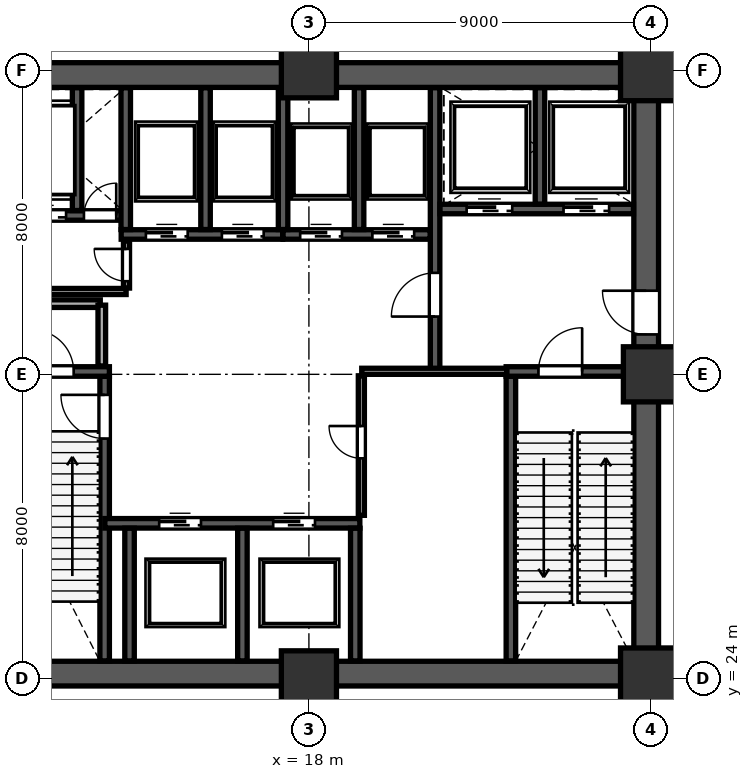
"""IFC4 building model, lengths in metres.
Left out: names, types, materials, properties, quantities, classifications, styles, units other than length and angle.
Written with IfcOpenShell. Run it as: python <this file> out.ifc"""

import sys

from ifc_helpers import new_model, si_unit, direction, frame, frame_2d, origin, origin_2d, place, context, subcontext, project, spatial, rectangle, extrude, source, transform, mapped, element, fill, save


model = new_model("IFC4")
c1 = context("Model", 3, precision=1e-05, world=origin(), true_north=direction((0.0, 1.0)))
c2 = subcontext(c1, "Body", "Model", "MODEL_VIEW")
j1 = project(units=[si_unit("LENGTHUNIT", "METRE"), si_unit("PLANEANGLEUNIT", "RADIAN")], contexts=[c1])
p1 = place(None, origin())
s1 = spatial("IfcSite", under=j1, at=p1, CompositionType="ELEMENT")
p2 = place(p1, origin())
s2 = spatial("IfcBuilding", under=s1, at=p2, CompositionType="ELEMENT")
p3 = place(p2, origin())
s3 = spatial("IfcBuildingStorey", under=s2, at=p3, CompositionType="ELEMENT", Elevation=0.0)
m1 = source(origin(), c2, "Body", "SweptSolid", [
    extrude(rectangle(XDim=1.45, YDim=1.45, at=origin_2d()), origin(), (0.0, 0.0, 1.0), 5.999),
])
p4 = place(p3, frame((18.0, 24.0, 0.001), z_axis=(0.0, 0.0, 1.0), x_axis=(1.0, 0.0, 0.0)))
e1 = element("IfcColumn", 1, at=p4, inside=s3, PredefinedType="COLUMN", context=c2, shape_type="MappedRepresentation", body=[
    mapped(m1, transform((0.0, 0.0, 0.0), scale=1.0)),
])
m2 = source(origin(), c2, "Body", "SweptSolid", [
    extrude(rectangle(XDim=1.45, YDim=1.45, at=origin_2d()), origin(), (0.0, 0.0, 1.0), 5.999),
])
p5 = place(p3, frame((18.0, 40.0, 0.001), z_axis=(0.0, 0.0, 1.0), x_axis=(1.0, 0.0, 0.0)))
e2 = element("IfcColumn", 2, at=p5, inside=s3, PredefinedType="COLUMN", context=c2, shape_type="MappedRepresentation", body=[
    mapped(m2, transform((0.0, 0.0, 0.0), scale=1.0)),
])
m3 = source(origin(), c2, "Body", "SweptSolid", [
    extrude(rectangle(XDim=1.6, YDim=1.6, at=origin_2d()), origin(), (0.0, 0.0, 1.0), 5.999),
])
p6 = place(p3, frame((27.0, 24.0, 0.001), z_axis=(0.0, 0.0, 1.0), x_axis=(1.0, 0.0, 0.0)))
e3 = element("IfcColumn", 3, at=p6, inside=s3, PredefinedType="COLUMN", context=c2, shape_type="MappedRepresentation", body=[
    mapped(m3, transform((0.0, 0.0, 0.0), scale=1.0)),
])
p7 = place(p3, frame((27.0, 32.0, 0.001), z_axis=(0.0, 0.0, 1.0), x_axis=(1.0, 0.0, 0.0)))
e4 = element("IfcColumn", 4, at=p7, inside=s3, PredefinedType="COLUMN", context=c2, shape_type="MappedRepresentation", body=[
    mapped(m2, transform((0.0, 0.0, 0.0), scale=1.0)),
])
m4 = source(origin(), c2, "Body", "SweptSolid", [
    extrude(rectangle(XDim=1.6, YDim=1.6, at=origin_2d()), origin(), (0.0, 0.0, 1.0), 5.999),
])
p8 = place(p3, frame((27.0, 40.0, 0.001), z_axis=(0.0, 0.0, 1.0), x_axis=(1.0, 0.0, 0.0)))
e5 = element("IfcColumn", 5, at=p8, inside=s3, PredefinedType="COLUMN", context=c2, shape_type="MappedRepresentation", body=[
    mapped(m4, transform((0.0, 0.0, 0.0), scale=1.0)),
])
p9 = place(p3, frame((26.875, 24.45, 0.0), z_axis=(0.0, 0.0, 1.0), x_axis=(0.0, 1.0, 0.0)))
e6 = element("IfcWall", 6, at=p9, inside=s3, PredefinedType="SHEAR", context=c2, shape_type="SweptSolid", body=[
    extrude(rectangle(XDim=15.1, YDim=0.65, at=frame_2d((7.55, 0.0))), origin(), (0.0, 0.0, 1.0), 5.74),
])
p10 = place(p9, frame((8.6, 0.0, 0.0)))
e7 = element("IfcOpeningElement", 7, at=p10, cuts=e6, PredefinedType="OPENING", context=c2, shape_type="SweptSolid", body=[
    extrude(rectangle(XDim=1.15, YDim=2.2, at=frame_2d((0.575, 1.1))), frame((0.0, 0.335, 0.0), z_axis=(0.0, -1.0, 0.0), x_axis=(1.0, 0.0, 0.0)), (0.0, 0.0, 1.0), 0.67),
])
for number, where, z_axis, x_axis in (
    (8, (8.8, 24.125, 0.0), (0.0, 0.0, 1.0), (1.0, 0.0, 0.0)),
    (9, (8.8, 39.875, 0.0), (0.0, 0.0, 1.0), (1.0, 0.0, 0.0)),
):
    element("IfcWall", number, at=place(p3, frame(where, z_axis=z_axis, x_axis=x_axis)), inside=s3, PredefinedType="SHEAR", context=c2, shape_type="SweptSolid", body=[
        extrude(rectangle(XDim=18.4, YDim=0.65, at=frame_2d((9.2, 0.0))), origin(), (0.0, 0.0, 1.0), 5.74),
    ])
p11 = place(p3, frame((12.625, 24.46, 0.0), z_axis=(0.0, 0.0, 1.0), x_axis=(0.0, 1.0, 0.0)))
e10 = element("IfcWall", 10, at=p11, inside=s3, PredefinedType="SHEAR", context=c2, shape_type="SweptSolid", body=[
    extrude(rectangle(XDim=7.49, YDim=0.25, at=frame_2d((3.745, 0.0))), origin(), (0.0, 0.0, 1.0), 5.74),
])
p12 = place(p11, frame((5.85, 0.0, 0.0)))
e11 = element("IfcOpeningElement", 11, at=p12, cuts=e10, PredefinedType="OPENING", context=c2, shape_type="SweptSolid", body=[
    extrude(rectangle(XDim=1.15, YDim=2.2, at=frame_2d((0.575, 1.1))), frame((0.0, 0.135, 0.0), z_axis=(0.0, -1.0, 0.0), x_axis=(1.0, 0.0, 0.0)), (0.0, 0.0, 1.0), 0.27),
])
p13 = place(p3, frame((9.46, 32.075, 0.0), z_axis=(0.0, 0.0, 1.0), x_axis=(1.0, 0.0, 0.0)))
e12 = element("IfcWall", 12, at=p13, inside=s3, PredefinedType="SHEAR", context=c2, shape_type="SweptSolid", body=[
    extrude(rectangle(XDim=3.29, YDim=0.25, at=frame_2d((1.645, 0.0))), origin(), (0.0, 0.0, 1.0), 5.74),
])
p14 = place(p13, frame((1.25, 0.0, 0.0)))
e13 = element("IfcOpeningElement", 13, at=p14, cuts=e12, PredefinedType="OPENING", context=c2, shape_type="SweptSolid", body=[
    extrude(rectangle(XDim=1.1, YDim=2.2, at=frame_2d((0.55, 1.1))), frame((0.0, 0.135, 0.0), z_axis=(0.0, -1.0, 0.0), x_axis=(1.0, 0.0, 0.0)), (0.0, 0.0, 1.0), 0.27),
])
p15 = place(p3, frame((23.315, 24.46, 0.0), z_axis=(0.0, 0.0, 1.0), x_axis=(0.0, 1.0, 0.0)))
e14 = element("IfcWall", 14, at=p15, inside=s3, PredefinedType="SHEAR", context=c2, shape_type="SweptSolid", body=[
    extrude(rectangle(XDim=7.49, YDim=0.25, at=frame_2d((3.745, 0.0))), origin(), (0.0, 0.0, 1.0), 5.74),
])
p16 = place(p3, frame((23.19, 32.075, 0.0), z_axis=(0.0, 0.0, 1.0), x_axis=(1.0, 0.0, 0.0)))
e15 = element("IfcWall", 15, at=p16, inside=s3, PredefinedType="SHEAR", context=c2, shape_type="SweptSolid", body=[
    extrude(rectangle(XDim=3.35, YDim=0.25, at=frame_2d((1.675, 0.0))), origin(), (0.0, 0.0, 1.0), 5.74),
])
p17 = place(p16, frame((0.85, 0.0, 0.0)))
e16 = element("IfcOpeningElement", 16, at=p17, cuts=e15, PredefinedType="OPENING", context=c2, shape_type="SweptSolid", body=[
    extrude(rectangle(XDim=1.15, YDim=2.2, at=frame_2d((0.575, 1.1))), frame((0.0, 0.135, 0.0), z_axis=(0.0, -1.0, 0.0), x_axis=(1.0, 0.0, 0.0)), (0.0, 0.0, 1.0), 0.27),
])
p18 = place(p3, frame((21.32, 32.12, 0.0), z_axis=(0.0, 0.0, 1.0), x_axis=(0.0, 1.0, 0.0)))
e17 = element("IfcWall", 17, at=p18, inside=s3, PredefinedType="SHEAR", context=c2, shape_type="SweptSolid", body=[
    extrude(rectangle(XDim=7.42, YDim=0.25, at=frame_2d((3.71, 0.0))), origin(), (0.0, 0.0, 1.0), 5.74),
])
p19 = place(p18, frame((1.4, 0.0, 0.0)))
e18 = element("IfcOpeningElement", 18, at=p19, cuts=e17, PredefinedType="OPENING", context=c2, shape_type="SweptSolid", body=[
    extrude(rectangle(XDim=1.15, YDim=2.2, at=frame_2d((0.575, 1.1))), frame((0.0, 0.135, 0.0), z_axis=(0.0, -1.0, 0.0), x_axis=(1.0, 0.0, 0.0)), (0.0, 0.0, 1.0), 0.27),
])
p20 = place(p3, frame((9.46, 36.18, 0.0), z_axis=(0.0, 0.0, 1.0), x_axis=(1.0, 0.0, 0.0)))
e19 = element("IfcWall", 19, at=p20, inside=s3, PredefinedType="SHEAR", context=c2, shape_type="SweptSolid", body=[
    extrude(rectangle(XDim=3.79, YDim=0.25, at=frame_2d((1.895, 0.0))), origin(), (0.0, 0.0, 1.0), 5.74),
])
p21 = place(p20, frame((2.62, 0.0, 0.0)))
e20 = element("IfcOpeningElement", 20, at=p21, cuts=e19, PredefinedType="OPENING", context=c2, shape_type="SweptSolid", body=[
    extrude(rectangle(XDim=0.85, YDim=2.1, at=frame_2d((0.425, 1.05))), frame((0.0, 0.135, 0.0), z_axis=(0.0, -1.0, 0.0), x_axis=(1.0, 0.0, 0.0)), (0.0, 0.0, 1.0), 0.27),
])
p22 = place(p20, frame((0.85, 0.0, 0.0)))
e21 = element("IfcOpeningElement", 21, at=p22, cuts=e19, PredefinedType="OPENING", context=c2, shape_type="SweptSolid", body=[
    extrude(rectangle(XDim=1.3, YDim=2.25, at=frame_2d((0.65, 1.125))), frame((0.0, 0.135, 0.0), z_axis=(0.0, -1.0, 0.0), x_axis=(1.0, 0.0, 0.0)), (0.0, 0.0, 1.0), 0.27),
])
p23 = place(p3, frame((11.9, 36.31, 0.0), z_axis=(0.0, 0.0, 1.0), x_axis=(0.0, 1.0, 0.0)))
e22 = element("IfcWall", 22, at=p23, inside=s3, PredefinedType="SHEAR", context=c2, shape_type="SweptSolid", body=[
    extrude(rectangle(XDim=3.23, YDim=0.25, at=frame_2d((1.615, 0.0))), origin(), (0.0, 0.0, 1.0), 5.74),
])
p24 = place(p3, frame((21.45, 36.35, 0.0), z_axis=(0.0, 0.0, 1.0), x_axis=(1.0, 0.0, 0.0)))
e23 = element("IfcWall", 23, at=p24, inside=s3, PredefinedType="SHEAR", context=c2, shape_type="SweptSolid", body=[
    extrude(rectangle(XDim=5.09, YDim=0.25, at=frame_2d((2.545, 0.0))), origin(), (0.0, 0.0, 1.0), 5.74),
])
p25 = place(p24, frame((0.7, 0.0, 0.0)))
e24 = element("IfcOpeningElement", 24, at=p25, cuts=e23, PredefinedType="OPENING", context=c2, shape_type="SweptSolid", body=[
    extrude(rectangle(XDim=1.2, YDim=2.2, at=frame_2d((0.6, 1.1))), frame((0.0, 0.135, 0.0), z_axis=(0.0, -1.0, 0.0), x_axis=(1.0, 0.0, 0.0)), (0.0, 0.0, 1.0), 0.27),
])
p26 = place(p24, frame((3.25, 0.0, 0.0)))
e25 = element("IfcOpeningElement", 25, at=p26, cuts=e23, PredefinedType="OPENING", context=c2, shape_type="SweptSolid", body=[
    extrude(rectangle(XDim=1.2, YDim=2.2, at=frame_2d((0.6, 1.1))), frame((0.0, 0.135, 0.0), z_axis=(0.0, -1.0, 0.0), x_axis=(1.0, 0.0, 0.0)), (0.0, 0.0, 1.0), 0.27),
])
p27 = place(p3, frame((24.08, 36.48, 0.0), z_axis=(0.0, 0.0, 1.0), x_axis=(0.0, 1.0, 0.0)))
e26 = element("IfcWall", 26, at=p27, inside=s3, PredefinedType="SHEAR", context=c2, shape_type="SweptSolid", body=[
    extrude(rectangle(XDim=3.06, YDim=0.25, at=frame_2d((1.53, 0.0))), origin(), (0.0, 0.0, 1.0), 5.74),
])
p28 = place(p3, frame((12.63, 28.08, 0.0), z_axis=(0.0, 0.0, 1.0), x_axis=(1.0, 0.0, 0.0)))
e27 = element("IfcWall", 27, at=p28, inside=s3, PredefinedType="SHEAR", context=c2, shape_type="SweptSolid", body=[
    extrude(rectangle(XDim=6.71, YDim=0.25, at=frame_2d((3.355, 0.0))), origin(), (0.0, 0.0, 1.0), 5.74),
])
p29 = place(p28, frame((1.43, 0.0, 0.0)))
e28 = element("IfcOpeningElement", 28, at=p29, cuts=e27, PredefinedType="OPENING", context=c2, shape_type="SweptSolid", body=[
    extrude(rectangle(XDim=1.1, YDim=2.2, at=frame_2d((0.55, 1.1))), frame((0.0, 0.135, 0.0), z_axis=(0.0, -1.0, 0.0), x_axis=(1.0, 0.0, 0.0)), (0.0, 0.0, 1.0), 0.27),
])
p30 = place(p28, frame((4.43, 0.0, 0.0)))
e29 = element("IfcOpeningElement", 29, at=p30, cuts=e27, PredefinedType="OPENING", context=c2, shape_type="SweptSolid", body=[
    extrude(rectangle(XDim=1.1, YDim=2.2, at=frame_2d((0.55, 1.1))), frame((0.0, 0.135, 0.0), z_axis=(0.0, -1.0, 0.0), x_axis=(1.0, 0.0, 0.0)), (0.0, 0.0, 1.0), 0.27),
])
for number, where, z_axis, x_axis in (
    (30, (13.28, 24.46, 0.0), (0.0, 0.0, 1.0), (0.0, 1.0, 0.0)),
    (31, (16.25, 24.46, 0.0), (0.0, 0.0, 1.0), (0.0, 1.0, 0.0)),
    (32, (19.22, 24.46, 0.0), (0.0, 0.0, 1.0), (0.0, 1.0, 0.0)),
):
    element("IfcWall", number, at=place(p3, frame(where, z_axis=z_axis, x_axis=x_axis)), inside=s3, PredefinedType="SHEAR", context=c2, shape_type="SweptSolid", body=[
        extrude(rectangle(XDim=3.49, YDim=0.25, at=frame_2d((1.745, 0.0))), origin(), (0.0, 0.0, 1.0), 5.74),
    ])
p31 = place(p3, frame((13.06, 35.68, 0.0), z_axis=(0.0, 0.0, 1.0), x_axis=(1.0, 0.0, 0.0)))
e33 = element("IfcWall", 33, at=p31, inside=s3, PredefinedType="SHEAR", context=c2, shape_type="SweptSolid", body=[
    extrude(rectangle(XDim=4.25, YDim=0.25, at=frame_2d((2.125, 0.0))), origin(), (0.0, 0.0, 1.0), 5.74),
])
p32 = place(p31, frame((0.65, 0.0, 0.0)))
e34 = element("IfcOpeningElement", 34, at=p32, cuts=e33, PredefinedType="OPENING", context=c2, shape_type="SweptSolid", body=[
    extrude(rectangle(XDim=1.1, YDim=2.2, at=frame_2d((0.55, 1.1))), frame((0.0, 0.135, 0.0), z_axis=(0.0, -1.0, 0.0), x_axis=(1.0, 0.0, 0.0)), (0.0, 0.0, 1.0), 0.27),
])
p33 = place(p31, frame((2.65, 0.0, 0.0)))
e35 = element("IfcOpeningElement", 35, at=p33, cuts=e33, PredefinedType="OPENING", context=c2, shape_type="SweptSolid", body=[
    extrude(rectangle(XDim=1.1, YDim=2.2, at=frame_2d((0.55, 1.1))), frame((0.0, 0.135, 0.0), z_axis=(0.0, -1.0, 0.0), x_axis=(1.0, 0.0, 0.0)), (0.0, 0.0, 1.0), 0.27),
])
for number, where, z_axis, x_axis in (
    (36, (13.18, 35.81, 0.0), (0.0, 0.0, 1.0), (0.0, 1.0, 0.0)),
    (37, (15.28, 35.81, 0.0), (0.0, 0.0, 1.0), (0.0, 1.0, 0.0)),
):
    element("IfcWall", number, at=place(p3, frame(where, z_axis=z_axis, x_axis=x_axis)), inside=s3, PredefinedType="SHEAR", context=c2, shape_type="SweptSolid", body=[
        extrude(rectangle(XDim=3.73, YDim=0.25, at=frame_2d((1.865, 0.0))), origin(), (0.0, 0.0, 1.0), 5.74),
    ])
p34 = place(p3, frame((17.32, 35.68, 0.0), z_axis=(0.0, 0.0, 1.0), x_axis=(1.0, 0.0, 0.0)))
e38 = element("IfcWall", 38, at=p34, inside=s3, PredefinedType="SHEAR", context=c2, shape_type="SweptSolid", body=[
    extrude(rectangle(XDim=3.87, YDim=0.25, at=frame_2d((1.935, 0.0))), origin(), (0.0, 0.0, 1.0), 5.74),
])
p35 = place(p34, frame((0.45, 0.0, 0.0)))
e39 = element("IfcOpeningElement", 39, at=p35, cuts=e38, PredefinedType="OPENING", context=c2, shape_type="SweptSolid", body=[
    extrude(rectangle(XDim=1.1, YDim=2.2, at=frame_2d((0.55, 1.1))), frame((0.0, 0.135, 0.0), z_axis=(0.0, -1.0, 0.0), x_axis=(1.0, 0.0, 0.0)), (0.0, 0.0, 1.0), 0.27),
])
p36 = place(p34, frame((2.35, 0.0, 0.0)))
e40 = element("IfcOpeningElement", 40, at=p36, cuts=e38, PredefinedType="OPENING", context=c2, shape_type="SweptSolid", body=[
    extrude(rectangle(XDim=1.1, YDim=2.2, at=frame_2d((0.55, 1.1))), frame((0.0, 0.135, 0.0), z_axis=(0.0, -1.0, 0.0), x_axis=(1.0, 0.0, 0.0)), (0.0, 0.0, 1.0), 0.27),
])
for number, where, z_axis, x_axis in (
    (41, (17.32, 35.81, 0.0), (0.0, 0.0, 1.0), (0.0, 1.0, 0.0)),
    (42, (19.32, 35.81, 0.0), (0.0, 0.0, 1.0), (0.0, 1.0, 0.0)),
):
    element("IfcWall", number, at=place(p3, frame(where, z_axis=z_axis, x_axis=x_axis)), inside=s3, PredefinedType="SHEAR", context=c2, shape_type="SweptSolid", body=[
        extrude(rectangle(XDim=3.73, YDim=0.25, at=frame_2d((1.865, 0.0))), origin(), (0.0, 0.0, 1.0), 5.74),
    ])
p37 = place(p3, frame((9.49, 34.18, 0.0), z_axis=(0.0, 0.0, 1.0), x_axis=(1.0, 0.0, 0.0)))
e43 = element("IfcWall", 43, at=p37, inside=s3, PredefinedType="PARTITIONING", context=c2, shape_type="SweptSolid", body=[
    extrude(rectangle(XDim=3.7, YDim=0.16, at=frame_2d((1.85, 0.0))), origin(), (0.0, 0.0, 1.0), 5.74),
])
p38 = place(p3, frame((13.2, 34.27, 0.0), z_axis=(0.0, 0.0, 1.0), x_axis=(0.0, 1.0, 0.0)))
e44 = element("IfcWall", 44, at=p38, inside=s3, PredefinedType="PARTITIONING", context=c2, shape_type="SweptSolid", body=[
    extrude(rectangle(XDim=1.24, YDim=0.16, at=frame_2d((0.62, 0.0))), origin(), (0.0, 0.0, 1.0), 5.74),
])
p39 = place(p38, frame((0.18, 0.0, 0.0)))
e45 = element("IfcOpeningElement", 45, at=p39, cuts=e44, PredefinedType="OPENING", context=c2, shape_type="SweptSolid", body=[
    extrude(rectangle(XDim=0.85, YDim=2.1, at=frame_2d((0.425, 1.05))), frame((0.0, 0.09, 0.0), z_axis=(0.0, -1.0, 0.0), x_axis=(1.0, 0.0, 0.0)), (0.0, 0.0, 1.0), 0.18),
])
p40 = place(p3, frame((19.39, 32.08, 0.0), z_axis=(0.0, 0.0, 1.0), x_axis=(1.0, 0.0, 0.0)))
e46 = element("IfcWall", 46, at=p40, inside=s3, PredefinedType="PARTITIONING", context=c2, shape_type="SweptSolid", body=[
    extrude(rectangle(XDim=3.82, YDim=0.16, at=frame_2d((1.91, 0.0))), origin(), (0.0, 0.0, 1.0), 5.74),
])
p41 = place(p3, frame((19.38, 28.29, 0.0), z_axis=(0.0, 0.0, 1.0), x_axis=(0.0, 1.0, 0.0)))
e47 = element("IfcWall", 47, at=p41, inside=s3, PredefinedType="PARTITIONING", context=c2, shape_type="SweptSolid", body=[
    extrude(rectangle(XDim=3.67, YDim=0.16, at=frame_2d((1.835, 0.0))), origin(), (0.0, 0.0, 1.0), 5.74),
])
p42 = place(p41, frame((1.5, 0.0, 0.0)))
e48 = element("IfcOpeningElement", 48, at=p42, cuts=e47, PredefinedType="OPENING", context=c2, shape_type="SweptSolid", body=[
    extrude(rectangle(XDim=0.85, YDim=2.1, at=frame_2d((0.425, 1.05))), frame((0.0, 0.09, 0.0), z_axis=(0.0, -1.0, 0.0), x_axis=(1.0, 0.0, 0.0)), (0.0, 0.0, 1.0), 0.18),
])
p43 = place(p3, frame((9.54, 33.86, 0.0), z_axis=(0.0, 0.0, 1.0), x_axis=(1.0, 0.0, 0.0)))
e49 = element("IfcWall", 49, at=p43, inside=s3, PredefinedType="SOLIDWALL", context=c2, shape_type="SweptSolid", body=[
    extrude(rectangle(XDim=2.97, YDim=0.2, at=frame_2d((1.485, 0.0))), origin(), (0.0, 0.0, 1.0), 5.74),
])
p44 = place(p3, frame((12.55, 32.22, 0.0), z_axis=(0.0, 0.0, 1.0), x_axis=(0.0, 1.0, 0.0)))
e50 = element("IfcWall", 50, at=p44, inside=s3, PredefinedType="SOLIDWALL", context=c2, shape_type="SweptSolid", body=[
    extrude(rectangle(XDim=1.6, YDim=0.2, at=frame_2d((0.8, 0.0))), origin(), (0.0, 0.0, 1.0), 5.74),
])
m5 = source(origin(), c2, "Body", "SweptSolid", [
    extrude(rectangle(XDim=1.15, YDim=2.2, at=frame_2d((0.575, 1.1))), frame((0.0, 0.025, 0.0), z_axis=(0.0, -1.0, 0.0), x_axis=(1.0, 0.0, 0.0)), (0.0, 0.0, 1.0), 0.05),
])
p45 = place(p12, origin())
e51 = element("IfcDoor", 51, at=p45, inside=s3, OperationType="SINGLE_SWING_RIGHT", PredefinedType="DOOR", context=c2, shape_type="MappedRepresentation", body=[
    mapped(m5, transform((0.0, 0.0, 0.0), scale=1.0)),
])
fill(e11, e51)
m6 = source(origin(), c2, "Body", "SweptSolid", [
    extrude(rectangle(XDim=1.15, YDim=2.2, at=frame_2d((0.575, 1.1))), frame((0.0, 0.025, 0.0), z_axis=(0.0, -1.0, 0.0), x_axis=(1.0, 0.0, 0.0)), (0.0, 0.0, 1.0), 0.05),
])
p46 = place(p19, origin())
e52 = element("IfcDoor", 52, at=p46, inside=s3, OperationType="SINGLE_SWING_LEFT", PredefinedType="DOOR", context=c2, shape_type="MappedRepresentation", body=[
    mapped(m6, transform((0.0, 0.0, 0.0), scale=1.0)),
])
fill(e18, e52)
p47 = place(p17, origin())
e53 = element("IfcDoor", 53, at=p47, inside=s3, OperationType="SINGLE_SWING_RIGHT", PredefinedType="DOOR", context=c2, shape_type="MappedRepresentation", body=[
    mapped(m5, transform((0.0, 0.0, 0.0), scale=1.0)),
])
fill(e16, e53)
p48 = place(p10, origin())
e54 = element("IfcDoor", 54, at=p48, inside=s3, OperationType="SINGLE_SWING_RIGHT", PredefinedType="DOOR", context=c2, shape_type="MappedRepresentation", body=[
    mapped(m6, transform((0.0, 0.0, 0.0), scale=1.0)),
])
fill(e7, e54)
m7 = source(origin(), c2, "Body", "SweptSolid", [
    extrude(rectangle(XDim=0.85, YDim=2.1, at=frame_2d((0.425, 1.05))), frame((0.0, 0.025, 0.0), z_axis=(0.0, -1.0, 0.0), x_axis=(1.0, 0.0, 0.0)), (0.0, 0.0, 1.0), 0.05),
])
p49 = place(p21, origin())
e55 = element("IfcDoor", 55, at=p49, inside=s3, OperationType="SINGLE_SWING_RIGHT", PredefinedType="DOOR", context=c2, shape_type="MappedRepresentation", body=[
    mapped(m7, transform((0.0, 0.0, 0.0), scale=1.0)),
])
fill(e20, e55)
m8 = source(origin(), c2, "Body", "SweptSolid", [
    extrude(rectangle(XDim=1.1, YDim=2.2, at=frame_2d((0.55, 1.1))), frame((0.0, 0.025, 0.0), z_axis=(0.0, -1.0, 0.0), x_axis=(1.0, 0.0, 0.0)), (0.0, 0.0, 1.0), 0.05),
])
p50 = place(p14, origin())
e56 = element("IfcDoor", 56, at=p50, inside=s3, OperationType="SINGLE_SWING_LEFT", PredefinedType="DOOR", context=c2, shape_type="MappedRepresentation", body=[
    mapped(m8, transform((0.0, 0.0, 0.0), scale=1.0)),
])
fill(e13, e56)
m9 = source(origin(), c2, "Body", "SweptSolid", [
    extrude(rectangle(XDim=1.1, YDim=2.2, at=frame_2d((0.55, 1.1))), frame((0.0, 0.025, 0.0), z_axis=(0.0, -1.0, 0.0), x_axis=(1.0, 0.0, 0.0)), (0.0, 0.0, 1.0), 0.05),
])
p51 = place(p29, origin())
e57 = element("IfcDoor", 57, at=p51, inside=s3, OperationType="SLIDING_TO_LEFT", PredefinedType="DOOR", context=c2, shape_type="MappedRepresentation", body=[
    mapped(m9, transform((0.0, 0.0, 0.0), scale=1.0)),
])
fill(e28, e57)
p52 = place(p30, origin())
e58 = element("IfcDoor", 58, at=p52, inside=s3, OperationType="SLIDING_TO_RIGHT", PredefinedType="DOOR", context=c2, shape_type="MappedRepresentation", body=[
    mapped(m9, transform((0.0, 0.0, 0.0), scale=1.0)),
])
fill(e29, e58)
p53 = place(p32, origin())
e59 = element("IfcDoor", 59, at=p53, inside=s3, OperationType="SLIDING_TO_LEFT", PredefinedType="DOOR", context=c2, shape_type="MappedRepresentation", body=[
    mapped(m9, transform((0.0, 0.0, 0.0), scale=1.0)),
])
fill(e34, e59)
p54 = place(p33, origin())
e60 = element("IfcDoor", 60, at=p54, inside=s3, OperationType="SLIDING_TO_RIGHT", PredefinedType="DOOR", context=c2, shape_type="MappedRepresentation", body=[
    mapped(m9, transform((0.0, 0.0, 0.0), scale=1.0)),
])
fill(e35, e60)
p55 = place(p35, origin())
e61 = element("IfcDoor", 61, at=p55, inside=s3, OperationType="SLIDING_TO_LEFT", PredefinedType="DOOR", context=c2, shape_type="MappedRepresentation", body=[
    mapped(m9, transform((0.0, 0.0, 0.0), scale=1.0)),
])
fill(e39, e61)
p56 = place(p36, origin())
e62 = element("IfcDoor", 62, at=p56, inside=s3, OperationType="SLIDING_TO_RIGHT", PredefinedType="DOOR", context=c2, shape_type="MappedRepresentation", body=[
    mapped(m9, transform((0.0, 0.0, 0.0), scale=1.0)),
])
fill(e40, e62)
m10 = source(origin(), c2, "Body", "SweptSolid", [
    extrude(rectangle(XDim=1.2, YDim=2.2, at=frame_2d((0.6, 1.1))), frame((0.0, 0.025, 0.0), z_axis=(0.0, -1.0, 0.0), x_axis=(1.0, 0.0, 0.0)), (0.0, 0.0, 1.0), 0.05),
])
p57 = place(p25, origin())
e63 = element("IfcDoor", 63, at=p57, inside=s3, OperationType="SLIDING_TO_LEFT", PredefinedType="DOOR", context=c2, shape_type="MappedRepresentation", body=[
    mapped(m10, transform((0.0, 0.0, 0.0), scale=1.0)),
])
fill(e24, e63)
p58 = place(p26, origin())
e64 = element("IfcDoor", 64, at=p58, inside=s3, OperationType="SLIDING_TO_RIGHT", PredefinedType="DOOR", context=c2, shape_type="MappedRepresentation", body=[
    mapped(m10, transform((0.0, 0.0, 0.0), scale=1.0)),
])
fill(e25, e64)
m11 = source(origin(), c2, "Body", "SweptSolid", [
    extrude(rectangle(XDim=1.3, YDim=2.25, at=frame_2d((0.65, 1.125))), frame((0.0, 0.025, 0.0), z_axis=(0.0, -1.0, 0.0), x_axis=(1.0, 0.0, 0.0)), (0.0, 0.0, 1.0), 0.05),
])
p59 = place(p22, origin())
e65 = element("IfcDoor", 65, at=p59, inside=s3, OperationType="SLIDING_TO_LEFT", PredefinedType="DOOR", context=c2, shape_type="MappedRepresentation", body=[
    mapped(m11, transform((0.0, 0.0, 0.0), scale=1.0)),
])
fill(e21, e65)
p60 = place(p39, origin())
e66 = element("IfcDoor", 66, at=p60, inside=s3, OperationType="SINGLE_SWING_RIGHT", PredefinedType="DOOR", context=c2, shape_type="MappedRepresentation", body=[
    mapped(m7, transform((0.0, 0.0, 0.0), scale=1.0)),
])
fill(e45, e66)
p61 = place(p42, origin())
e67 = element("IfcDoor", 67, at=p61, inside=s3, OperationType="SINGLE_SWING_RIGHT", PredefinedType="DOOR", context=c2, shape_type="MappedRepresentation", body=[
    mapped(m7, transform((0.0, 0.0, 0.0), scale=1.0)),
])
fill(e48, e67)
save(model, sys.argv[1])
